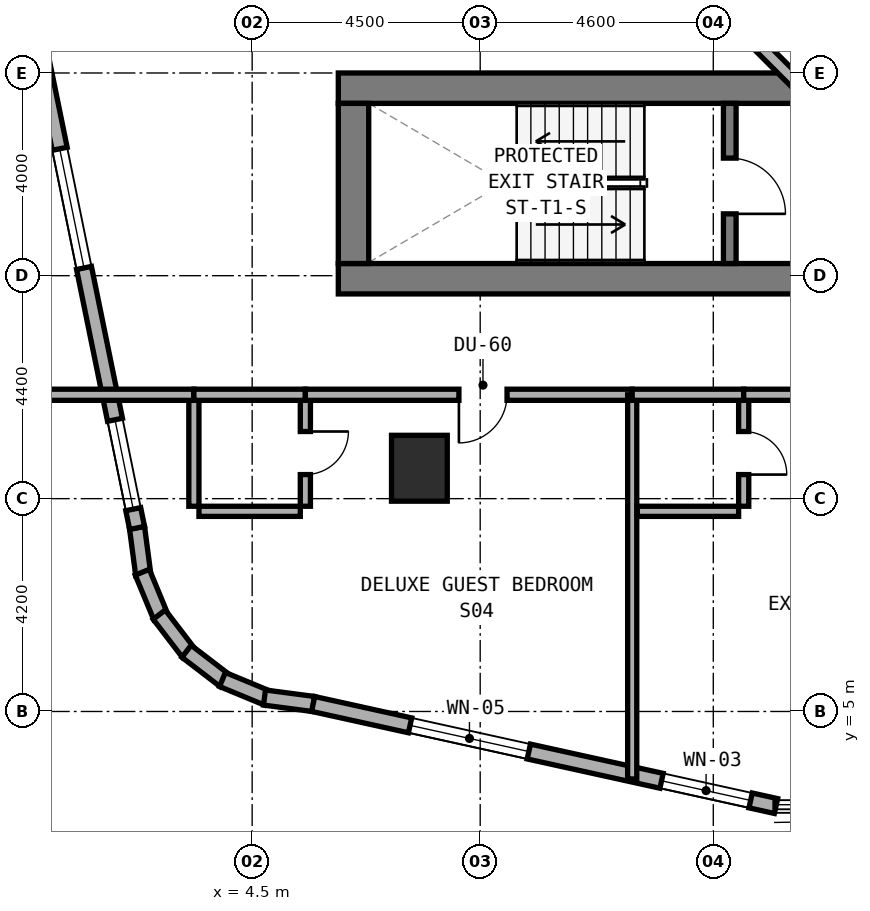
"""IFC4 building model, lengths in metres.
Left out: names, types, materials, properties, quantities, classifications, styles, units other than length and angle.
Written with IfcOpenShell. Run it as: python <this file> out.ifc"""

import sys

from ifc_helpers import new_model, si_unit, direction, frame, frame_2d, origin, origin_2d, place, context, subcontext, project, spatial, rectangle, extrude, element, fill, save


model = new_model("IFC4")
c1 = context("Model", 3, precision=1e-05, world=origin(), true_north=direction((0.0, 1.0)))
c2 = subcontext(c1, "Body", "Model", "MODEL_VIEW")
j1 = project(units=[si_unit("LENGTHUNIT", "METRE"), si_unit("PLANEANGLEUNIT", "RADIAN")], contexts=[c1])
p1 = place(None, origin())
s1 = spatial("IfcSite", under=j1, at=p1, CompositionType="ELEMENT")
p2 = place(p1, origin())
s2 = spatial("IfcBuilding", under=s1, at=p2, CompositionType="ELEMENT")
p3 = place(p2, frame((0.0, 0.0, 38.0)))
s3 = spatial("IfcBuildingStorey", under=s2, at=p3, CompositionType="ELEMENT", Elevation=38.0)
p4 = place(p3, frame((6.2, 13.54, 0.0), z_axis=(0.0, 0.0, 1.0), x_axis=(1.0, 0.0, 0.0)))
e1 = element("IfcWall", 1, at=p4, inside=s3, PredefinedType="SHEAR", context=c2, shape_type="SweptSolid", body=[
    extrude(rectangle(XDim=24.8, YDim=0.6, at=frame_2d((12.4, 0.0))), origin(), (0.0, 0.0, 1.0), 3.5),
])
p5 = place(p4, frame((9.35, 0.0, 0.0)))
e2 = element("IfcOpeningElement", 2, at=p5, cuts=e1, PredefinedType="OPENING", context=c2, shape_type="SweptSolid", body=[
    extrude(rectangle(XDim=1.2, YDim=2.15, at=frame_2d((0.6, 1.075))), frame((0.0, 0.31, 0.0), z_axis=(0.0, -1.0, 0.0), x_axis=(1.0, 0.0, 0.0)), (0.0, 0.0, 1.0), 0.62),
])
p6 = place(p4, frame((17.14, 0.0, 0.0)))
e3 = element("IfcOpeningElement", 3, at=p6, cuts=e1, PredefinedType="OPENING", context=c2, shape_type="SweptSolid", body=[
    extrude(rectangle(XDim=0.85, YDim=2.1, at=frame_2d((0.425, 1.05))), frame((0.0, 0.31, 0.0), z_axis=(0.0, -1.0, 0.0), x_axis=(1.0, 0.0, 0.0)), (0.0, 0.0, 1.0), 0.62),
])
p7 = place(p3, frame((6.2, 17.3, 0.0), z_axis=(0.0, 0.0, 1.0), x_axis=(1.0, 0.0, 0.0)))
e4 = element("IfcWall", 4, at=p7, inside=s3, PredefinedType="SHEAR", context=c2, shape_type="SweptSolid", body=[
    extrude(rectangle(XDim=24.8, YDim=0.6, at=frame_2d((12.4, 0.0))), origin(), (0.0, 0.0, 1.0), 3.5),
])
p8 = place(p3, frame((6.5, 13.84, 0.0), z_axis=(0.0, 0.0, 1.0), x_axis=(0.0, 1.0, 0.0)))
e5 = element("IfcWall", 5, at=p8, inside=s3, PredefinedType="SHEAR", context=c2, shape_type="SweptSolid", body=[
    extrude(rectangle(XDim=3.16, YDim=0.6, at=frame_2d((1.58, 0.0))), origin(), (0.0, 0.0, 1.0), 3.5),
])
p9 = place(p3, frame((13.925, 13.84, 0.0), z_axis=(0.0, 0.0, 1.0), x_axis=(0.0, 1.0, 0.0)))
e6 = element("IfcWall", 6, at=p9, inside=s3, PredefinedType="STANDARD", context=c2, shape_type="SweptSolid", body=[
    extrude(rectangle(XDim=3.16, YDim=0.25, at=frame_2d((1.58, 0.0))), origin(), (0.0, 0.0, 1.0), 3.22),
])
p10 = place(p9, frame((0.98, 0.0, 0.0)))
e7 = element("IfcOpeningElement", 7, at=p10, cuts=e6, PredefinedType="OPENING", context=c2, shape_type="SweptSolid", body=[
    extrude(rectangle(XDim=1.1, YDim=2.15, at=frame_2d((0.55, 1.075))), frame((0.0, 0.135, 0.0), z_axis=(0.0, -1.0, 0.0), x_axis=(1.0, 0.0, 0.0)), (0.0, 0.0, 1.0), 0.27),
])
p11 = place(p3, frame((7.8, 9.8, 0.0), z_axis=(0.0, 0.0, 1.0), x_axis=(1.0, 0.0, 0.0)))
e8 = element("IfcColumn", 8, at=p11, inside=s3, PredefinedType="COLUMN", context=c2, shape_type="SweptSolid", body=[
    extrude(rectangle(XDim=1.1, YDim=1.3, at=origin_2d()), origin(), (0.0, 0.0, 1.0), 3.5),
])
p12 = place(p3, frame((2.228, 8.628, 0.0), z_axis=(0.0, 0.0, 1.0), x_axis=(0.131174864804, -0.991359246108, 0.0)))
e9 = element("IfcWall", 9, at=p12, inside=s3, PredefinedType="STANDARD", context=c2, shape_type="SweptSolid", body=[
    extrude(rectangle(XDim=0.938, YDim=0.3, at=frame_2d((0.469, 0.0))), origin(), (0.0, 0.0, 1.0), 3.22),
])
p13 = place(p3, frame((2.332, 7.748, 0.0), z_axis=(0.0, 0.0, 1.0), x_axis=(0.382344263057, -0.924019948111, 0.0)))
e10 = element("IfcWall", 10, at=p13, inside=s3, PredefinedType="STANDARD", context=c2, shape_type="SweptSolid", body=[
    extrude(rectangle(XDim=0.955, YDim=0.3, at=frame_2d((0.477, 0.0))), origin(), (0.0, 0.0, 1.0), 3.22),
])
for number, where, z_axis, x_axis in (
    (11, (2.666, 6.911, 0.0), (0.0, 0.0, 1.0), (0.608, -0.794, 0.0)),
    (12, (3.205, 6.188, 0.0), (0.0, 0.0, 1.0), (0.794, -0.608, 0.0)),
):
    element("IfcWall", number, at=place(p3, frame(where, z_axis=z_axis, x_axis=x_axis)), inside=s3, PredefinedType="STANDARD", context=c2, shape_type="SweptSolid", body=[
        extrude(rectangle(XDim=0.955, YDim=0.3, at=frame_2d((0.478, 0.0))), origin(), (0.0, 0.0, 1.0), 3.22),
    ])
p14 = place(p3, frame((3.914, 5.631, 0.0), z_axis=(0.0, 0.0, 1.0), x_axis=(0.923982547689, -0.382434636986, 0.0)))
e13 = element("IfcWall", 13, at=p14, inside=s3, PredefinedType="STANDARD", context=c2, shape_type="SweptSolid", body=[
    extrude(rectangle(XDim=0.954, YDim=0.3, at=frame_2d((0.477, 0.0))), origin(), (0.0, 0.0, 1.0), 3.22),
])
p15 = place(p3, frame((4.743, 5.275, 0.0), z_axis=(0.0, 0.0, 1.0), x_axis=(0.99145856342, -0.130422072598, 0.0)))
e14 = element("IfcWall", 14, at=p15, inside=s3, PredefinedType="STANDARD", context=c2, shape_type="SweptSolid", body=[
    extrude(rectangle(XDim=0.973, YDim=0.3, at=frame_2d((0.487, 0.0))), origin(), (0.0, 0.0, 1.0), 3.22),
])
p16 = place(p3, frame((5.704, 5.148, 0.0), z_axis=(0.0, 0.0, 1.0), x_axis=(0.9765437942, -0.215318875183, 0.0)))
e15 = element("IfcWall", 15, at=p16, inside=s3, PredefinedType="STANDARD", context=c2, shape_type="SweptSolid", body=[
    extrude(rectangle(XDim=9.353, YDim=0.3, at=frame_2d((4.677, 0.0))), origin(), (0.0, 0.0, 1.0), 3.22),
])
p17 = place(p16, frame((1.958, 0.0, 0.8)))
e16 = element("IfcOpeningElement", 16, at=p17, cuts=e15, PredefinedType="OPENING", context=c2, shape_type="SweptSolid", body=[
    extrude(rectangle(XDim=2.4, YDim=1.6, at=frame_2d((1.2, 0.8))), frame((0.0, 0.16, 0.0), z_axis=(0.0, -1.0, 0.0), x_axis=(1.0, 0.0, 0.0)), (0.0, 0.0, 1.0), 0.32),
])
p18 = place(p16, frame((7.04, 0.0, 0.85)))
e17 = element("IfcOpeningElement", 17, at=p18, cuts=e15, PredefinedType="OPENING", context=c2, shape_type="SweptSolid", body=[
    extrude(rectangle(XDim=1.8, YDim=1.5, at=frame_2d((0.9, 0.75))), frame((0.0, 0.16, 0.0), z_axis=(0.0, -1.0, 0.0), x_axis=(1.0, 0.0, 0.0)), (0.0, 0.0, 1.0), 0.32),
])
p19 = place(p3, frame((0.216, 18.484, 0.0), z_axis=(0.0, 0.0, 1.0), x_axis=(0.199990901713, -0.979797754249, 0.0)))
e18 = element("IfcWall", 18, at=p19, inside=s3, PredefinedType="STANDARD", context=c2, shape_type="SweptSolid", body=[
    extrude(rectangle(XDim=10.065, YDim=0.3, at=frame_2d((5.033, 0.0))), origin(), (0.0, 0.0, 1.0), 3.22),
])
p20 = place(p19, frame((2.429, 0.0, 0.8)))
e19 = element("IfcOpeningElement", 19, at=p20, cuts=e18, PredefinedType="OPENING", context=c2, shape_type="SweptSolid", body=[
    extrude(rectangle(XDim=2.4, YDim=1.6, at=frame_2d((1.2, 0.8))), frame((0.0, 0.16, 0.0), z_axis=(0.0, -1.0, 0.0), x_axis=(1.0, 0.0, 0.0)), (0.0, 0.0, 1.0), 0.32),
])
p21 = place(p19, frame((7.887, 0.0, 0.85)))
e20 = element("IfcOpeningElement", 20, at=p21, cuts=e18, PredefinedType="OPENING", context=c2, shape_type="SweptSolid", body=[
    extrude(rectangle(XDim=1.8, YDim=1.5, at=frame_2d((0.9, 0.75))), frame((0.0, 0.16, 0.0), z_axis=(0.0, -1.0, 0.0), x_axis=(1.0, 0.0, 0.0)), (0.0, 0.0, 1.0), 0.32),
])
p22 = place(p3, frame((13.484, 19.172, 0.0), z_axis=(0.0, 0.0, 1.0), x_axis=(0.707106781187, -0.707106781187, 0.0)))
e21 = element("IfcWall", 21, at=p22, inside=s3, PredefinedType="STANDARD", context=c2, shape_type="SweptSolid", body=[
    extrude(rectangle(XDim=2.594, YDim=0.26, at=frame_2d((1.297, 0.0))), origin(), (0.0, 0.0, 1.0), 3.22),
])
p23 = place(p3, frame((5.55, 9.05, 0.0), z_axis=(0.0, 0.0, 1.0), x_axis=(0.0, 1.0, 0.0)))
e22 = element("IfcWall", 22, at=p23, inside=s3, PredefinedType="PLUMBINGWALL", context=c2, shape_type="SweptSolid", body=[
    extrude(rectangle(XDim=2.1, YDim=0.2, at=frame_2d((1.05, 0.0))), origin(), (0.0, 0.0, 1.0), 3.22),
])
p24 = place(p23, frame((0.625, 0.0, 0.0)))
e23 = element("IfcOpeningElement", 23, at=p24, cuts=e22, PredefinedType="OPENING", context=c2, shape_type="SweptSolid", body=[
    extrude(rectangle(XDim=0.85, YDim=2.1, at=frame_2d((0.425, 1.05))), frame((0.0, 0.11, 0.0), z_axis=(0.0, -1.0, 0.0), x_axis=(1.0, 0.0, 0.0)), (0.0, 0.0, 1.0), 0.22),
])
p25 = place(p3, frame((3.45, 8.95, 0.0), z_axis=(0.0, 0.0, 1.0), x_axis=(1.0, 0.0, 0.0)))
e24 = element("IfcWall", 24, at=p25, inside=s3, PredefinedType="PLUMBINGWALL", context=c2, shape_type="SweptSolid", body=[
    extrude(rectangle(XDim=2.0, YDim=0.2, at=frame_2d((1.0, 0.0))), origin(), (0.0, 0.0, 1.0), 3.22),
])
p26 = place(p3, frame((3.35, 9.05, 0.0), z_axis=(0.0, 0.0, 1.0), x_axis=(0.0, 1.0, 0.0)))
e25 = element("IfcWall", 25, at=p26, inside=s3, PredefinedType="PLUMBINGWALL", context=c2, shape_type="SweptSolid", body=[
    extrude(rectangle(XDim=2.1, YDim=0.2, at=frame_2d((1.05, 0.0))), origin(), (0.0, 0.0, 1.0), 3.22),
])
p27 = place(p3, frame((0.24, 11.25, 0.0), z_axis=(0.0, 0.0, 1.0), x_axis=(1.0, 0.0, 0.0)))
e26 = element("IfcWall", 26, at=p27, inside=s3, PredefinedType="SOLIDWALL", context=c2, shape_type="SweptSolid", body=[
    extrude(rectangle(XDim=3.11, YDim=0.22, at=frame_2d((1.555, 0.0))), origin(), (0.0, 0.0, 1.0), 3.22),
])
p28 = place(p3, frame((3.35, 11.25, 0.0), z_axis=(0.0, 0.0, 1.0), x_axis=(1.0, 0.0, 0.0)))
e27 = element("IfcWall", 27, at=p28, inside=s3, PredefinedType="SOLIDWALL", context=c2, shape_type="SweptSolid", body=[
    extrude(rectangle(XDim=2.2, YDim=0.22, at=frame_2d((1.1, 0.0))), origin(), (0.0, 0.0, 1.0), 3.22),
])
p29 = place(p3, frame((5.55, 11.25, 0.0), z_axis=(0.0, 0.0, 1.0), x_axis=(1.0, 0.0, 0.0)))
e28 = element("IfcWall", 28, at=p29, inside=s3, PredefinedType="SOLIDWALL", context=c2, shape_type="SweptSolid", body=[
    extrude(rectangle(XDim=6.45, YDim=0.22, at=frame_2d((3.225, 0.0))), origin(), (0.0, 0.0, 1.0), 2.395),
])
p30 = place(p29, frame((3.03, 0.0, 0.0)))
e29 = element("IfcOpeningElement", 29, at=p30, cuts=e28, PredefinedType="OPENING", context=c2, shape_type="SweptSolid", body=[
    extrude(rectangle(XDim=0.95, YDim=2.1, at=frame_2d((0.475, 1.05))), frame((0.0, 0.12, 0.0), z_axis=(0.0, -1.0, 0.0), x_axis=(1.0, 0.0, 0.0)), (0.0, 0.0, 1.0), 0.24),
])
p31 = place(p3, frame((12.0, 3.668, 0.0), z_axis=(0.0, 0.0, 1.0), x_axis=(0.0, 1.0, 0.0)))
e30 = element("IfcWall", 30, at=p31, inside=s3, PredefinedType="SOLIDWALL", context=c2, shape_type="SweptSolid", body=[
    extrude(rectangle(XDim=7.582, YDim=0.18, at=frame_2d((3.791, 0.0))), origin(), (0.0, 0.0, 1.0), 2.745),
])
p32 = place(p3, frame((14.2, 9.05, 0.0), z_axis=(0.0, 0.0, 1.0), x_axis=(0.0, 1.0, 0.0)))
e31 = element("IfcWall", 31, at=p32, inside=s3, PredefinedType="PLUMBINGWALL", context=c2, shape_type="SweptSolid", body=[
    extrude(rectangle(XDim=2.1, YDim=0.2, at=frame_2d((1.05, 0.0))), origin(), (0.0, 0.0, 1.0), 2.745),
])
p33 = place(p32, frame((0.625, 0.0, 0.0)))
e32 = element("IfcOpeningElement", 32, at=p33, cuts=e31, PredefinedType="OPENING", context=c2, shape_type="SweptSolid", body=[
    extrude(rectangle(XDim=0.85, YDim=2.1, at=frame_2d((0.425, 1.05))), frame((0.0, 0.11, 0.0), z_axis=(0.0, -1.0, 0.0), x_axis=(1.0, 0.0, 0.0)), (0.0, 0.0, 1.0), 0.22),
])
p34 = place(p3, frame((12.1, 8.95, 0.0), z_axis=(0.0, 0.0, 1.0), x_axis=(1.0, 0.0, 0.0)))
e33 = element("IfcWall", 33, at=p34, inside=s3, PredefinedType="PLUMBINGWALL", context=c2, shape_type="SweptSolid", body=[
    extrude(rectangle(XDim=2.0, YDim=0.2, at=frame_2d((1.0, 0.0))), origin(), (0.0, 0.0, 1.0), 3.22),
])
p35 = place(p3, frame((12.0, 11.25, 0.0), z_axis=(0.0, 0.0, 1.0), x_axis=(1.0, 0.0, 0.0)))
e34 = element("IfcWall", 34, at=p35, inside=s3, PredefinedType="SOLIDWALL", context=c2, shape_type="SweptSolid", body=[
    extrude(rectangle(XDim=2.2, YDim=0.22, at=frame_2d((1.1, 0.0))), origin(), (0.0, 0.0, 1.0), 2.865),
])
p36 = place(p3, frame((14.2, 11.25, 0.0), z_axis=(0.0, 0.0, 1.0), x_axis=(1.0, 0.0, 0.0)))
e35 = element("IfcWall", 35, at=p36, inside=s3, PredefinedType="SOLIDWALL", context=c2, shape_type="SweptSolid", body=[
    extrude(rectangle(XDim=11.6, YDim=0.22, at=frame_2d((5.8, 0.0))), origin(), (0.0, 0.0, 1.0), 2.395),
])
p37 = place(p36, frame((5.325, 0.0, 0.0)))
e36 = element("IfcOpeningElement", 36, at=p37, cuts=e35, PredefinedType="OPENING", context=c2, shape_type="SweptSolid", body=[
    extrude(rectangle(XDim=0.95, YDim=2.1, at=frame_2d((0.475, 1.05))), frame((0.0, 0.12, 0.0), z_axis=(0.0, -1.0, 0.0), x_axis=(1.0, 0.0, 0.0)), (0.0, 0.0, 1.0), 0.24),
])
p38 = place(p17, origin())
e37 = element("IfcWindow", 37, at=p38, inside=s3, PartitioningType="SINGLE_PANEL", PredefinedType="WINDOW", context=c2, shape_type="SweptSolid", body=[
    extrude(rectangle(XDim=2.4, YDim=1.6, at=frame_2d((1.2, 0.8))), frame((0.0, 0.03, 0.0), z_axis=(0.0, -1.0, 0.0), x_axis=(1.0, 0.0, 0.0)), (0.0, 0.0, 1.0), 0.06),
])
fill(e16, e37)
p39 = place(p18, origin())
e38 = element("IfcWindow", 38, at=p39, inside=s3, PartitioningType="SINGLE_PANEL", PredefinedType="WINDOW", context=c2, shape_type="SweptSolid", body=[
    extrude(rectangle(XDim=1.8, YDim=1.5, at=frame_2d((0.9, 0.75))), frame((0.0, 0.03, 0.0), z_axis=(0.0, -1.0, 0.0), x_axis=(1.0, 0.0, 0.0)), (0.0, 0.0, 1.0), 0.06),
])
fill(e17, e38)
p40 = place(p20, origin())
e39 = element("IfcWindow", 39, at=p40, inside=s3, PartitioningType="SINGLE_PANEL", PredefinedType="WINDOW", context=c2, shape_type="SweptSolid", body=[
    extrude(rectangle(XDim=2.4, YDim=1.6, at=frame_2d((1.2, 0.8))), frame((0.0, 0.03, 0.0), z_axis=(0.0, -1.0, 0.0), x_axis=(1.0, 0.0, 0.0)), (0.0, 0.0, 1.0), 0.06),
])
fill(e19, e39)
p41 = place(p21, origin())
e40 = element("IfcWindow", 40, at=p41, inside=s3, PartitioningType="SINGLE_PANEL", PredefinedType="WINDOW", context=c2, shape_type="SweptSolid", body=[
    extrude(rectangle(XDim=1.8, YDim=1.5, at=frame_2d((0.9, 0.75))), frame((0.0, 0.03, 0.0), z_axis=(0.0, -1.0, 0.0), x_axis=(1.0, 0.0, 0.0)), (0.0, 0.0, 1.0), 0.06),
])
fill(e20, e40)
p42 = place(p10, frame((1.1, 0.0, 0.0), z_axis=(0.0, 0.0, 1.0), x_axis=(-1.0, 0.0, 0.0)))
e41 = element("IfcDoor", 41, at=p42, inside=s3, OperationType="SINGLE_SWING_RIGHT", PredefinedType="DOOR", context=c2, shape_type="SweptSolid", body=[
    extrude(rectangle(XDim=1.1, YDim=2.15, at=frame_2d((0.55, 1.075))), frame((0.0, 0.025, 0.0), z_axis=(0.0, -1.0, 0.0), x_axis=(1.0, 0.0, 0.0)), (0.0, 0.0, 1.0), 0.05),
])
fill(e7, e41)
p43 = place(p24, frame((0.85, 0.0, 0.0), z_axis=(0.0, 0.0, 1.0), x_axis=(-1.0, 0.0, 0.0)))
e42 = element("IfcDoor", 42, at=p43, inside=s3, OperationType="SINGLE_SWING_LEFT", PredefinedType="DOOR", context=c2, shape_type="SweptSolid", body=[
    extrude(rectangle(XDim=0.85, YDim=2.1, at=frame_2d((0.425, 1.05))), frame((0.0, 0.025, 0.0), z_axis=(0.0, -1.0, 0.0), x_axis=(1.0, 0.0, 0.0)), (0.0, 0.0, 1.0), 0.05),
])
fill(e23, e42)
p44 = place(p30, frame((0.95, 0.0, 0.0), z_axis=(0.0, 0.0, 1.0), x_axis=(-1.0, 0.0, 0.0)))
e43 = element("IfcDoor", 43, at=p44, inside=s3, OperationType="SINGLE_SWING_RIGHT", PredefinedType="DOOR", context=c2, shape_type="SweptSolid", body=[
    extrude(rectangle(XDim=0.95, YDim=2.1, at=frame_2d((0.475, 1.05))), frame((0.0, 0.025, 0.0), z_axis=(0.0, -1.0, 0.0), x_axis=(1.0, 0.0, 0.0)), (0.0, 0.0, 1.0), 0.05),
])
fill(e29, e43)
p45 = place(p33, frame((0.85, 0.0, 0.0), z_axis=(0.0, 0.0, 1.0), x_axis=(-1.0, 0.0, 0.0)))
e44 = element("IfcDoor", 44, at=p45, inside=s3, OperationType="SINGLE_SWING_RIGHT", PredefinedType="DOOR", context=c2, shape_type="SweptSolid", body=[
    extrude(rectangle(XDim=0.85, YDim=2.1, at=frame_2d((0.425, 1.05))), frame((0.0, 0.025, 0.0), z_axis=(0.0, -1.0, 0.0), x_axis=(1.0, 0.0, 0.0)), (0.0, 0.0, 1.0), 0.05),
])
fill(e32, e44)
save(model, sys.argv[1])
